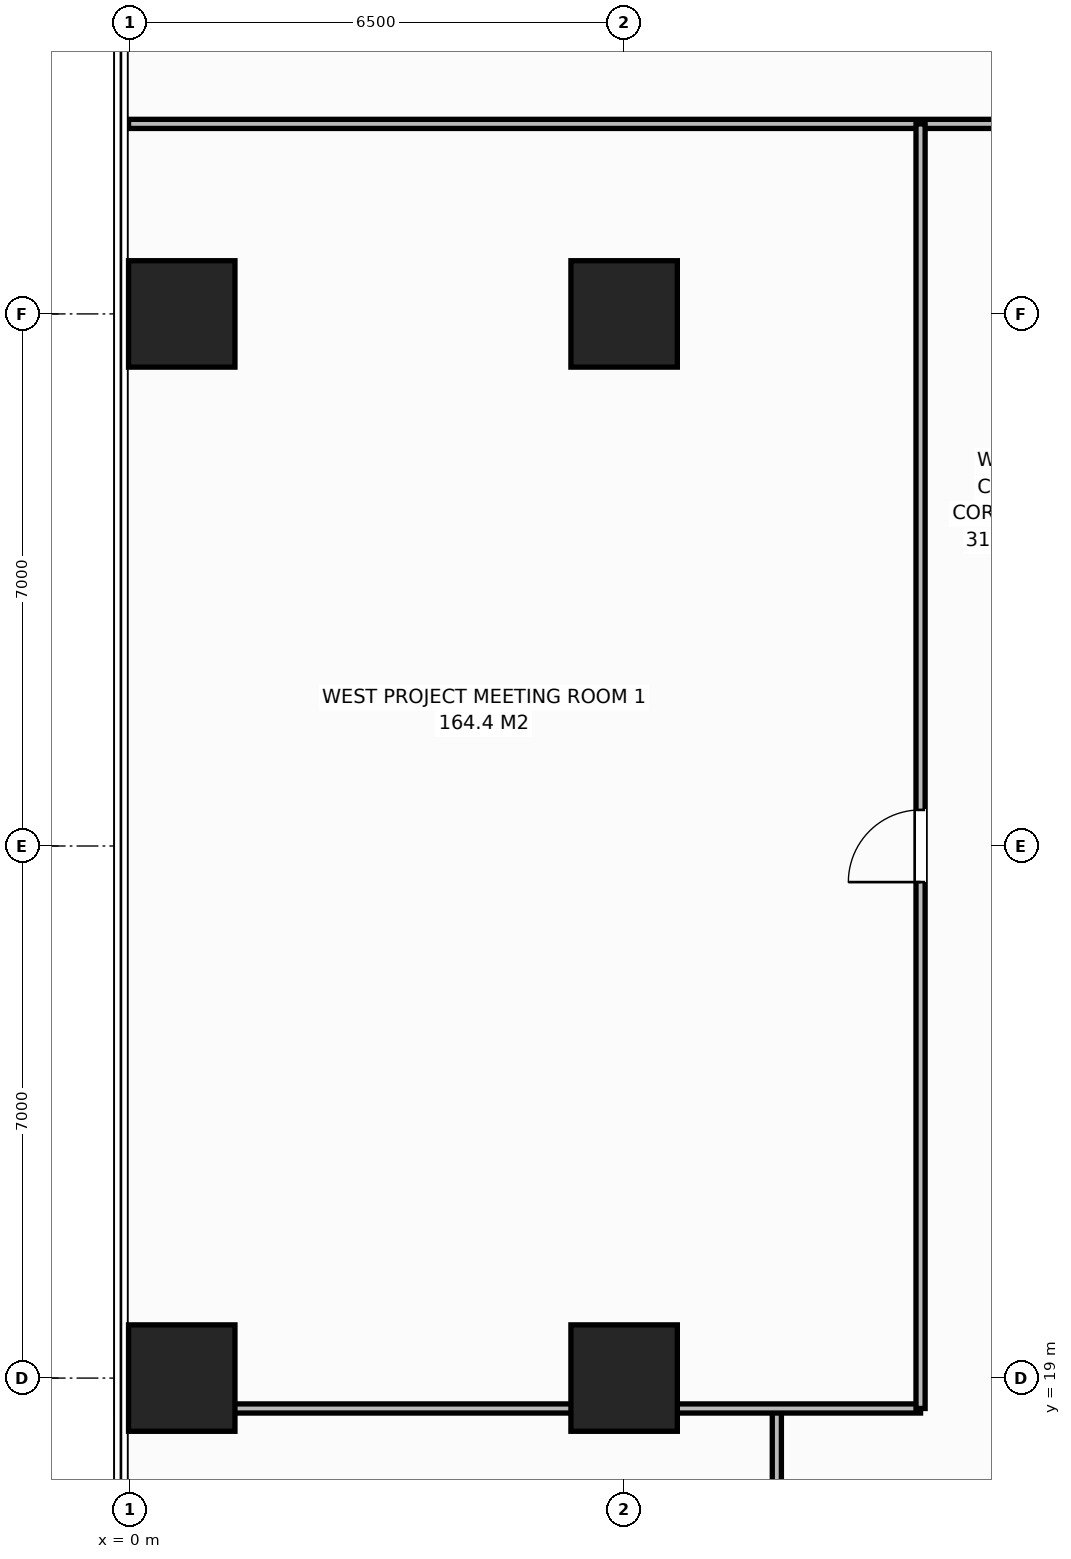
"""IFC4 building model, lengths in metres.
Left out: names, types, materials, properties, quantities, classifications, styles, units other than length and angle.
Written with IfcOpenShell. Run it as: python <this file> out.ifc"""

import sys

from ifc_helpers import new_model, si_unit, direction, frame, frame_2d, origin, origin_2d, place, context, subcontext, project, spatial, rectangle, extrude, element, fill, save


model = new_model("IFC4")
c1 = context("Model", 3, precision=1e-05, world=origin(), true_north=direction((0.0, 1.0)))
c2 = subcontext(c1, "Body", "Model", "MODEL_VIEW")
j1 = project(units=[si_unit("LENGTHUNIT", "METRE"), si_unit("PLANEANGLEUNIT", "RADIAN")], contexts=[c1])
p1 = place(None, origin())
s1 = spatial("IfcSite", under=j1, at=p1, CompositionType="ELEMENT")
p2 = place(p1, origin())
s2 = spatial("IfcBuilding", under=s1, at=p2, CompositionType="ELEMENT")
p3 = place(p2, frame((0.0, 0.0, 69.6)))
s3 = spatial("IfcBuildingStorey", under=s2, at=p3, CompositionType="ELEMENT", Elevation=69.6)
for number, where, z_axis, x_axis in (
    (1, (6.5, 19.0, 0.0), (0.0, 0.0, 1.0), (1.0, 0.0, 0.0)),
    (2, (6.5, 33.0, 0.0), (0.0, 0.0, 1.0), (1.0, 0.0, 0.0)),
    (3, (0.68, 19.0, 0.0), (0.0, 0.0, 1.0), (1.0, 0.0, 0.0)),
    (4, (0.68, 33.0, 0.0), (0.0, 0.0, 1.0), (1.0, 0.0, 0.0)),
):
    element("IfcColumn", number, at=place(p3, frame(where, z_axis=z_axis, x_axis=x_axis)), inside=s3, PredefinedType="COLUMN", context=c2, shape_type="SweptSolid", body=[
        extrude(rectangle(XDim=1.4, YDim=1.4, at=origin_2d()), origin(), (0.0, 0.0, 1.0), 3.8),
    ])
p4 = place(p3, frame((8.509, 16.5, 0.0), z_axis=(0.0, 0.0, 1.0), x_axis=(0.0, 1.0, 0.0)))
e5 = element("IfcWall", 5, at=p4, inside=s3, PredefinedType="PARTITIONING", context=c2, shape_type="SweptSolid", body=[
    extrude(rectangle(XDim=2.1, YDim=0.12, at=frame_2d((1.05, 0.0))), origin(), (0.0, 0.0, 1.0), 3.55),
])
p5 = place(p3, frame((-0.02, 35.5, 0.0), z_axis=(0.0, 0.0, 1.0), x_axis=(1.0, 0.0, 0.0)))
e6 = element("IfcWall", 6, at=p5, inside=s3, PredefinedType="PARTITIONING", context=c2, shape_type="SweptSolid", body=[
    extrude(rectangle(XDim=21.136, YDim=0.12, at=frame_2d((10.568, 0.0))), origin(), (0.0, 0.0, 1.0), 3.55),
])
p6 = place(p5, frame((15.303, 0.0, 0.0)))
e7 = element("IfcOpeningElement", 7, at=p6, cuts=e6, PredefinedType="OPENING", context=c2, shape_type="SweptSolid", body=[
    extrude(rectangle(XDim=0.95, YDim=2.15, at=frame_2d((0.475, 1.075))), frame((0.0, 0.07, 0.0), z_axis=(0.0, -1.0, 0.0), x_axis=(1.0, 0.0, 0.0)), (0.0, 0.0, 1.0), 0.14),
])
p7 = place(p3, frame((-0.18, 18.6, 0.0), z_axis=(0.0, 0.0, 1.0), x_axis=(1.0, 0.0, 0.0)))
e8 = element("IfcWall", 8, at=p7, inside=s3, PredefinedType="PARTITIONING", context=c2, shape_type="SweptSolid", body=[
    extrude(rectangle(XDim=10.58, YDim=0.12, at=frame_2d((5.29, 0.0))), origin(), (0.0, 0.0, 1.0), 3.55),
])
p8 = place(p3, frame((10.4, 18.6, 0.0), z_axis=(0.0, 0.0, 1.0), x_axis=(0.0, 1.0, 0.0)))
e9 = element("IfcWall", 9, at=p8, inside=s3, PredefinedType="PARTITIONING", context=c2, shape_type="SweptSolid", body=[
    extrude(rectangle(XDim=16.9, YDim=0.12, at=frame_2d((8.45, 0.0))), origin(), (0.0, 0.0, 1.0), 3.55),
])
p9 = place(p8, frame((6.925, 0.0, 0.0)))
e10 = element("IfcOpeningElement", 10, at=p9, cuts=e9, PredefinedType="OPENING", context=c2, shape_type="SweptSolid", body=[
    extrude(rectangle(XDim=0.95, YDim=2.15, at=frame_2d((0.475, 1.075))), frame((0.0, 0.07, 0.0), z_axis=(0.0, -1.0, 0.0), x_axis=(1.0, 0.0, 0.0)), (0.0, 0.0, 1.0), 0.14),
])
p10 = place(p9, origin())
e11 = element("IfcDoor", 11, at=p10, inside=s3, OperationType="SINGLE_SWING_LEFT", PredefinedType="DOOR", context=c2, shape_type="SweptSolid", body=[
    extrude(rectangle(XDim=0.95, YDim=2.15, at=frame_2d((0.475, 1.075))), frame((0.0, 0.025, 0.0), z_axis=(0.0, -1.0, 0.0), x_axis=(1.0, 0.0, 0.0)), (0.0, 0.0, 1.0), 0.05),
])
fill(e10, e11)
save(model, sys.argv[1])
